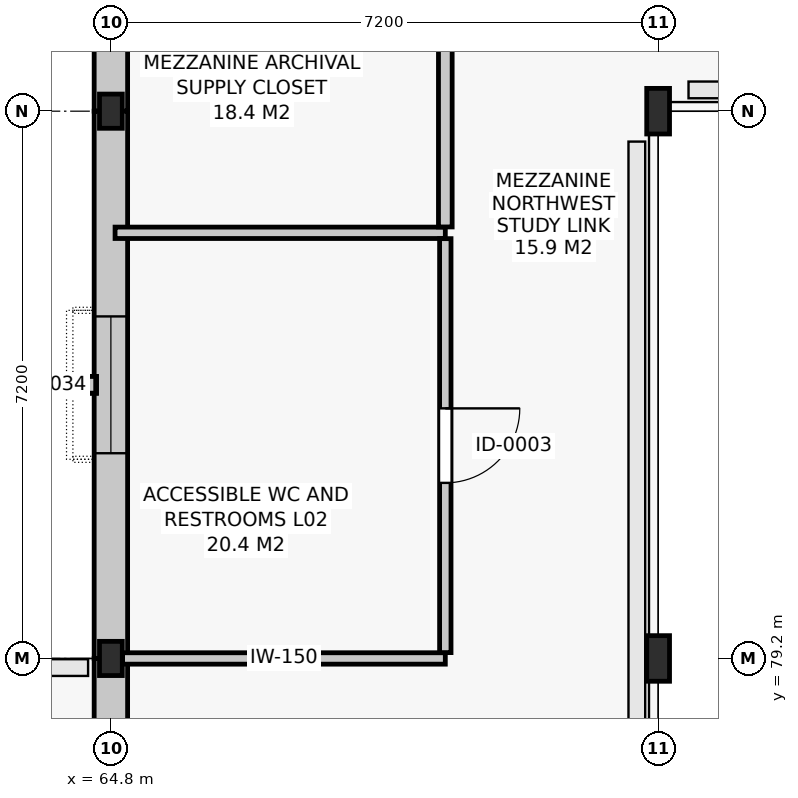
"""IFC4 building model, lengths in metres.
Left out: names, types, materials, properties, quantities, classifications, styles, units other than length and angle.
Written with IfcOpenShell. Run it as: python <this file> out.ifc"""

import sys

from ifc_helpers import new_model, si_unit, direction, frame, frame_2d, origin, origin_2d, place, context, subcontext, project, spatial, rectangle, i_section, extrude, element, fill, save


model = new_model("IFC4")
c1 = context("Model", 3, precision=1e-05, world=origin(), true_north=direction((0.0, 1.0)))
c2 = subcontext(c1, "Body", "Model", "MODEL_VIEW")
j1 = project(units=[si_unit("LENGTHUNIT", "METRE"), si_unit("PLANEANGLEUNIT", "RADIAN")], contexts=[c1])
p1 = place(None, origin())
s1 = spatial("IfcSite", under=j1, at=p1, CompositionType="ELEMENT")
p2 = place(p1, origin())
s2 = spatial("IfcBuilding", under=s1, at=p2, CompositionType="ELEMENT")
p3 = place(p2, frame((0.0, 0.0, 10.2)))
s3 = spatial("IfcBuildingStorey", under=s2, at=p3, CompositionType="ELEMENT", Elevation=10.2)
for number, where, z_axis, x_axis in (
    (1, (64.8, 79.2, 0.0), (0.0, 0.0, 1.0), (1.0, 0.0, 0.0)),
    (2, (64.8, 86.4, 0.0), (0.0, 0.0, 1.0), (1.0, 0.0, 0.0)),
):
    element("IfcColumn", number, at=place(p3, frame(where, z_axis=z_axis, x_axis=x_axis)), inside=s3, PredefinedType="COLUMN", context=c2, shape_type="SweptSolid", body=[
        extrude(i_section(OverallWidth=0.3, OverallDepth=0.45, WebThickness=0.014, FlangeThickness=0.026, FilletRadius=0.027, at=origin_2d()), origin(), (0.0, 0.0, 1.0), 4.2),
    ])
for number, where, z_axis, x_axis in (
    (3, (72.0, 79.2, 0.0), (0.0, 0.0, 1.0), (1.0, 0.0, 0.0)),
    (4, (72.0, 86.4, 0.0), (0.0, 0.0, 1.0), (1.0, 0.0, 0.0)),
):
    element("IfcColumn", number, at=place(p3, frame(where, z_axis=z_axis, x_axis=x_axis)), inside=s3, PredefinedType="COLUMN", context=c2, shape_type="SweptSolid", body=[
        extrude(i_section(OverallWidth=0.3, OverallDepth=0.6, WebThickness=0.015, FlangeThickness=0.03, FilletRadius=0.027, at=origin_2d()), origin(), (0.0, 0.0, 1.0), 4.2),
    ])
p4 = place(p3, frame((64.8, 93.371, 0.0), z_axis=(0.0, 0.0, 1.0), x_axis=(0.0, -1.0, 0.0)))
e5 = element("IfcWall", 5, at=p4, inside=s3, PredefinedType="SOLIDWALL", context=c2, shape_type="SweptSolid", body=[
    extrude(rectangle(XDim=6.971, YDim=0.44, at=frame_2d((3.486, 0.0))), origin(), (0.0, 0.0, 1.0), 3.2),
])
p5 = place(p3, frame((64.8, 86.4, 0.0), z_axis=(0.0, 0.0, 1.0), x_axis=(0.0, -1.0, 0.0)))
e6 = element("IfcWall", 6, at=p5, inside=s3, PredefinedType="SOLIDWALL", context=c2, shape_type="SweptSolid", body=[
    extrude(rectangle(XDim=7.2, YDim=0.44, at=frame_2d((3.6, 0.0))), origin(), (0.0, 0.0, 1.0), 3.2),
])
p6 = place(p5, frame((2.7, 0.0, 0.95)))
e7 = element("IfcOpeningElement", 7, at=p6, cuts=e6, PredefinedType="OPENING", context=c2, shape_type="SweptSolid", body=[
    extrude(rectangle(XDim=1.8, YDim=2.05, at=frame_2d((0.9, 1.025))), frame((0.0, 0.232, 0.0), z_axis=(0.0, -1.0, 0.0), x_axis=(1.0, 0.0, 0.0)), (0.0, 0.0, 1.0), 0.464),
])
p7 = place(p3, frame((64.8, 79.2, 0.0), z_axis=(0.0, 0.0, 1.0), x_axis=(0.0, -1.0, 0.0)))
e8 = element("IfcWall", 8, at=p7, inside=s3, PredefinedType="SOLIDWALL", context=c2, shape_type="SweptSolid", body=[
    extrude(rectangle(XDim=7.2, YDim=0.44, at=frame_2d((3.6, 0.0))), origin(), (0.0, 0.0, 1.0), 3.2),
])
p8 = place(p7, frame((2.7, 0.0, 0.0)))
e9 = element("IfcOpeningElement", 9, at=p8, cuts=e8, PredefinedType="OPENING", context=c2, shape_type="SweptSolid", body=[
    extrude(rectangle(XDim=1.8, YDim=2.3, at=frame_2d((0.9, 1.15))), frame((0.0, 0.232, 0.0), z_axis=(0.0, -1.0, 0.0), x_axis=(1.0, 0.0, 0.0)), (0.0, 0.0, 1.0), 0.464),
])
p9 = place(p3, frame((64.954, 79.2, 0.0), z_axis=(0.0, 0.0, 1.0), x_axis=(1.0, 0.0, 0.0)))
e10 = element("IfcWall", 10, at=p9, inside=s3, PredefinedType="PARTITIONING", context=c2, shape_type="SweptSolid", body=[
    extrude(rectangle(XDim=4.246, YDim=0.15, at=frame_2d((2.123, 0.0))), origin(), (0.0, 0.0, 1.0), 3.545),
])
p10 = place(p3, frame((64.855, 84.8, 0.0), z_axis=(0.0, 0.0, 1.0), x_axis=(1.0, 0.0, 0.0)))
e11 = element("IfcWall", 11, at=p10, inside=s3, PredefinedType="PARTITIONING", context=c2, shape_type="SweptSolid", body=[
    extrude(rectangle(XDim=4.345, YDim=0.15, at=frame_2d((2.172, 0.0))), origin(), (0.0, 0.0, 1.0), 3.355),
])
p11 = place(p3, frame((69.2, 79.277, 0.0), z_axis=(0.0, 0.0, 1.0), x_axis=(0.0, 1.0, 0.0)))
e12 = element("IfcWall", 12, at=p11, inside=s3, PredefinedType="PARTITIONING", context=c2, shape_type="SweptSolid", body=[
    extrude(rectangle(XDim=5.446, YDim=0.15, at=frame_2d((2.723, 0.0))), origin(), (0.0, 0.0, 1.0), 3.545),
])
p12 = place(p11, frame((2.233, 0.0, 0.0)))
e13 = element("IfcOpeningElement", 13, at=p12, cuts=e12, PredefinedType="OPENING", context=c2, shape_type="SweptSolid", body=[
    extrude(rectangle(XDim=0.98, YDim=2.1, at=frame_2d((0.49, 1.05))), frame((0.0, 0.087, 0.0), z_axis=(0.0, -1.0, 0.0), x_axis=(1.0, 0.0, 0.0)), (0.0, 0.0, 1.0), 0.174),
])
p13 = place(p3, frame((69.2, 84.877, 0.0), z_axis=(0.0, 0.0, 1.0), x_axis=(0.0, 1.0, 0.0)))
e14 = element("IfcWall", 14, at=p13, inside=s3, PredefinedType="PARTITIONING", context=c2, shape_type="SweptSolid", body=[
    extrude(rectangle(XDim=4.931, YDim=0.18, at=frame_2d((2.466, 0.0))), origin(), (0.0, 0.0, 1.0), 3.545),
])
p14 = place(p13, frame((2.607, 0.0, 0.0)))
e15 = element("IfcOpeningElement", 15, at=p14, cuts=e14, PredefinedType="OPENING", context=c2, shape_type="SweptSolid", body=[
    extrude(rectangle(XDim=1.0, YDim=2.15, at=frame_2d((0.5, 1.075))), frame((0.0, 0.102, 0.0), z_axis=(0.0, -1.0, 0.0), x_axis=(1.0, 0.0, 0.0)), (0.0, 0.0, 1.0), 0.204),
])
p15 = place(p6, origin())
e16 = element("IfcWindow", 16, at=p15, inside=s3, PartitioningType="SINGLE_PANEL", PredefinedType="WINDOW", context=c2, shape_type="SweptSolid", body=[
    extrude(rectangle(XDim=1.8, YDim=2.05, at=frame_2d((0.9, 1.025))), frame((0.0, 0.03, 0.0), z_axis=(0.0, -1.0, 0.0), x_axis=(1.0, 0.0, 0.0)), (0.0, 0.0, 1.0), 0.06),
])
fill(e7, e16)
p16 = place(p12, frame((0.98, 0.0, 0.0), z_axis=(0.0, 0.0, 1.0), x_axis=(-1.0, 0.0, 0.0)))
e17 = element("IfcDoor", 17, at=p16, inside=s3, OperationType="SINGLE_SWING_LEFT", PredefinedType="DOOR", context=c2, shape_type="SweptSolid", body=[
    extrude(rectangle(XDim=0.98, YDim=2.1, at=frame_2d((0.49, 1.05))), frame((0.0, 0.025, 0.0), z_axis=(0.0, -1.0, 0.0), x_axis=(1.0, 0.0, 0.0)), (0.0, 0.0, 1.0), 0.05),
])
fill(e13, e17)
save(model, sys.argv[1])
